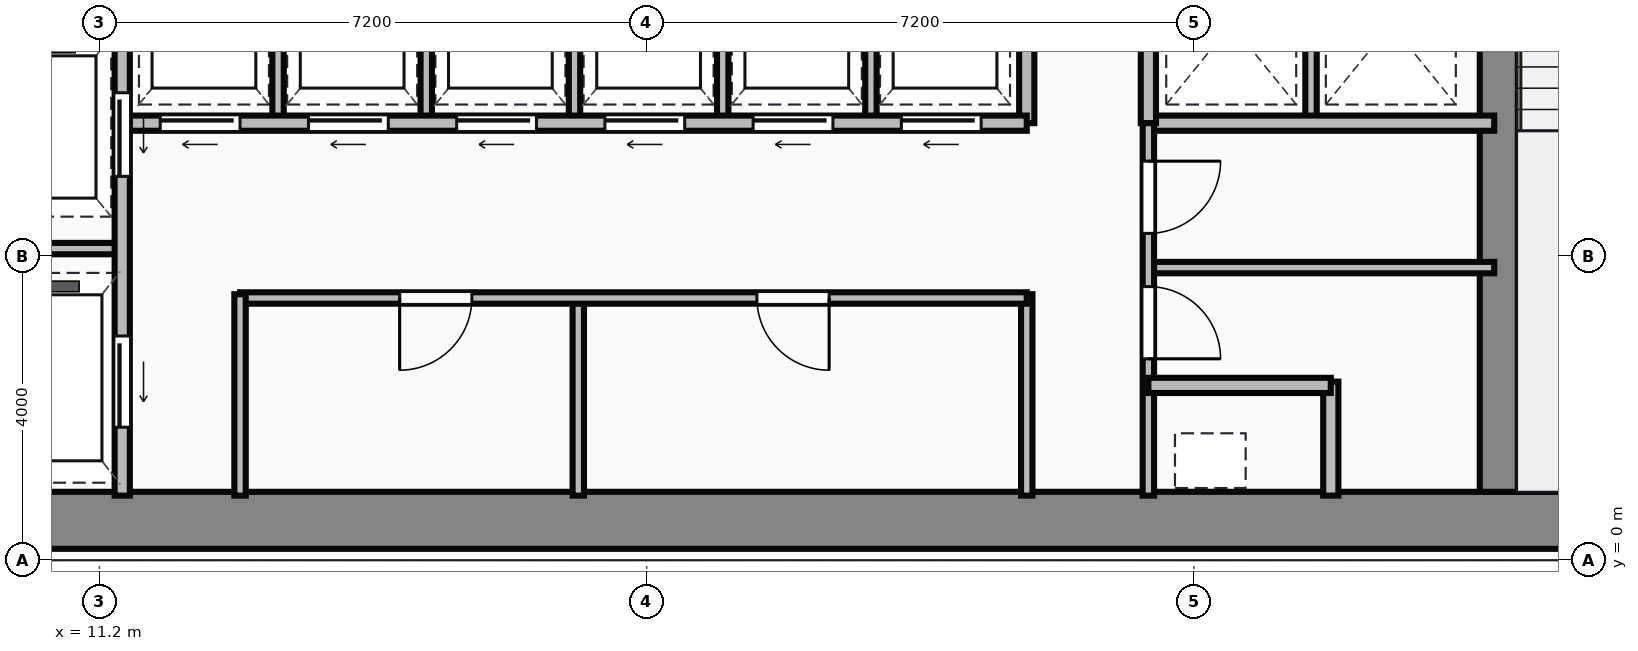
"""IFC4 building model, lengths in metres.
Left out: names, types, materials, properties, quantities, classifications, styles, units other than length and angle.
Written with IfcOpenShell. Run it as: python <this file> out.ifc"""

import sys

from ifc_helpers import new_model, si_unit, direction, frame, frame_2d, origin, place, context, subcontext, project, spatial, rectangle, extrude, source, transform, mapped, element, fill, save


model = new_model("IFC4")
c1 = context("Model", 3, precision=1e-05, world=origin(), true_north=direction((0.0, 1.0)))
c2 = subcontext(c1, "Body", "Model", "MODEL_VIEW")
j1 = project(units=[si_unit("LENGTHUNIT", "METRE"), si_unit("PLANEANGLEUNIT", "RADIAN")], contexts=[c1])
p1 = place(None, origin())
s1 = spatial("IfcSite", under=j1, at=p1, CompositionType="ELEMENT")
p2 = place(p1, origin())
s2 = spatial("IfcBuilding", under=s1, at=p2, CompositionType="ELEMENT")
p3 = place(p2, frame((0.0, 0.0, 158.85)))
s3 = spatial("IfcBuildingStorey", under=s2, at=p3, CompositionType="ELEMENT", Elevation=158.85)
m1 = source(origin(), c2, "Body", "SweptSolid", [
    extrude(rectangle(XDim=29.5, YDim=0.75, at=frame_2d((14.75, 0.0))), origin(), (0.0, 0.0, 1.0), 3.65),
])
p4 = place(p3, frame((4.5, 0.525, 0.0), z_axis=(0.0, 0.0, 1.0), x_axis=(1.0, 0.0, 0.0)))
e1 = element("IfcWall", 1, at=p4, inside=s3, PredefinedType="SHEAR", context=c2, shape_type="MappedRepresentation", body=[
    mapped(m1, transform((0.0, 0.0, 0.0))),
])
m2 = source(origin(), c2, "Body", "SweptSolid", [
    extrude(rectangle(XDim=12.35, YDim=0.5, at=frame_2d((6.175, 0.0))), origin(), (0.0, 0.0, 1.0), 3.65),
])
p5 = place(p3, frame((29.61, 0.9, 0.0), z_axis=(0.0, 0.0, 1.0), x_axis=(0.0, 1.0, 0.0)))
e2 = element("IfcWall", 2, at=p5, inside=s3, PredefinedType="SHEAR", context=c2, shape_type="MappedRepresentation", body=[
    mapped(m2, transform((0.0, 0.0, 0.0))),
])
m3 = source(origin(), c2, "Body", "SweptSolid", [
    extrude(rectangle(XDim=9.6, YDim=0.2, at=frame_2d((4.8, 0.0))), origin(), (0.0, 0.0, 1.0), 3.4),
])
p6 = place(p3, frame((11.5, 0.85, 0.0), z_axis=(0.0, 0.0, 1.0), x_axis=(0.0, 1.0, 0.0)))
e3 = element("IfcWall", 3, at=p6, inside=s3, PredefinedType="PARTITIONING", context=c2, shape_type="MappedRepresentation", body=[
    mapped(m3, transform((0.0, 0.0, 0.0))),
])
p7 = place(p6, frame((4.2, 0.0, 0.0)))
e4 = element("IfcOpeningElement", 4, at=p7, cuts=e3, PredefinedType="OPENING", context=c2, shape_type="SweptSolid", body=[
    extrude(rectangle(XDim=1.1, YDim=2.15, at=frame_2d((0.55, 1.075))), frame((0.0, 0.11, 0.0), z_axis=(0.0, -1.0, 0.0), x_axis=(1.0, 0.0, 0.0)), (0.0, 0.0, 1.0), 0.22),
])
p8 = place(p6, frame((0.9, 0.0, 0.0)))
e5 = element("IfcOpeningElement", 5, at=p8, cuts=e3, PredefinedType="OPENING", context=c2, shape_type="SweptSolid", body=[
    extrude(rectangle(XDim=1.2, YDim=2.15, at=frame_2d((0.6, 1.075))), frame((0.0, 0.11, 0.0), z_axis=(0.0, -1.0, 0.0), x_axis=(1.0, 0.0, 0.0)), (0.0, 0.0, 1.0), 0.22),
])
m4 = source(origin(), c2, "Body", "SweptSolid", [
    extrude(rectangle(XDim=2.4, YDim=0.15, at=frame_2d((1.2, 0.0))), origin(), (0.0, 0.0, 1.0), 3.4),
])
p9 = place(p3, frame((9.1, 4.1, 0.0), z_axis=(0.0, 0.0, 1.0), x_axis=(1.0, 0.0, 0.0)))
e6 = element("IfcWall", 6, at=p9, inside=s3, PredefinedType="PARTITIONING", context=c2, shape_type="MappedRepresentation", body=[
    mapped(m4, transform((0.0, 0.0, 0.0))),
])
m5 = source(origin(), c2, "Body", "SweptSolid", [
    extrude(rectangle(XDim=2.65, YDim=0.15, at=frame_2d((1.325, 0.0))), origin(), (0.0, 0.0, 1.0), 3.4),
])
p10 = place(p3, frame((13.05, 0.85, 0.0), z_axis=(0.0, 0.0, 1.0), x_axis=(0.0, 1.0, 0.0)))
e7 = element("IfcWall", 7, at=p10, inside=s3, PredefinedType="PARTITIONING", context=c2, shape_type="MappedRepresentation", body=[
    mapped(m5, transform((0.0, 0.0, 0.0))),
])
m6 = source(origin(), c2, "Body", "SweptSolid", [
    extrude(rectangle(XDim=10.35, YDim=0.15, at=frame_2d((5.175, 0.0))), origin(), (0.0, 0.0, 1.0), 3.4),
])
p11 = place(p3, frame((13.05, 3.45, 0.0), z_axis=(0.0, 0.0, 1.0), x_axis=(1.0, 0.0, 0.0)))
e8 = element("IfcWall", 8, at=p11, inside=s3, PredefinedType="PARTITIONING", context=c2, shape_type="MappedRepresentation", body=[
    mapped(m6, transform((0.0, 0.0, 0.0))),
])
p12 = place(p11, frame((2.1, 0.0, 0.0)))
e9 = element("IfcOpeningElement", 9, at=p12, cuts=e8, PredefinedType="OPENING", context=c2, shape_type="SweptSolid", body=[
    extrude(rectangle(XDim=0.95, YDim=2.15, at=frame_2d((0.475, 1.075))), frame((0.0, 0.085, 0.0), z_axis=(0.0, -1.0, 0.0), x_axis=(1.0, 0.0, 0.0)), (0.0, 0.0, 1.0), 0.17),
])
p13 = place(p11, frame((6.8, 0.0, 0.0)))
e10 = element("IfcOpeningElement", 10, at=p13, cuts=e8, PredefinedType="OPENING", context=c2, shape_type="SweptSolid", body=[
    extrude(rectangle(XDim=0.95, YDim=2.15, at=frame_2d((0.475, 1.075))), frame((0.0, 0.085, 0.0), z_axis=(0.0, -1.0, 0.0), x_axis=(1.0, 0.0, 0.0)), (0.0, 0.0, 1.0), 0.17),
])
p14 = place(p3, frame((23.4, 0.85, 0.0), z_axis=(0.0, 0.0, 1.0), x_axis=(0.0, 1.0, 0.0)))
e11 = element("IfcWall", 11, at=p14, inside=s3, PredefinedType="PARTITIONING", context=c2, shape_type="MappedRepresentation", body=[
    mapped(m5, transform((0.0, 0.0, 0.0))),
])
m7 = source(origin(), c2, "Body", "SweptSolid", [
    extrude(rectangle(XDim=2.6, YDim=0.15, at=frame_2d((1.3, 0.0))), origin(), (0.0, 0.0, 1.0), 3.4),
])
p15 = place(p3, frame((17.5, 0.85, 0.0), z_axis=(0.0, 0.0, 1.0), x_axis=(0.0, 1.0, 0.0)))
e12 = element("IfcWall", 12, at=p15, inside=s3, PredefinedType="PARTITIONING", context=c2, shape_type="MappedRepresentation", body=[
    mapped(m7, transform((0.0, 0.0, 0.0))),
])
m8 = source(origin(), c2, "Body", "SweptSolid", [
    extrude(rectangle(XDim=11.85, YDim=0.2, at=frame_2d((5.925, 0.0))), origin(), (0.0, 0.0, 1.0), 3.4),
])
p16 = place(p3, frame((11.55, 5.75, 0.0), z_axis=(0.0, 0.0, 1.0), x_axis=(1.0, 0.0, 0.0)))
e13 = element("IfcWall", 13, at=p16, inside=s3, PredefinedType="PARTITIONING", context=c2, shape_type="MappedRepresentation", body=[
    mapped(m8, transform((0.0, 0.0, 0.0))),
])
p17 = place(p16, frame((0.45, 0.0, 0.0)))
e14 = element("IfcOpeningElement", 14, at=p17, cuts=e13, PredefinedType="OPENING", context=c2, shape_type="SweptSolid", body=[
    extrude(rectangle(XDim=1.05, YDim=2.15, at=frame_2d((0.525, 1.075))), frame((0.0, 0.11, 0.0), z_axis=(0.0, -1.0, 0.0), x_axis=(1.0, 0.0, 0.0)), (0.0, 0.0, 1.0), 0.22),
])
p18 = place(p16, frame((2.4, 0.0, 0.0)))
e15 = element("IfcOpeningElement", 15, at=p18, cuts=e13, PredefinedType="OPENING", context=c2, shape_type="SweptSolid", body=[
    extrude(rectangle(XDim=1.05, YDim=2.15, at=frame_2d((0.525, 1.075))), frame((0.0, 0.11, 0.0), z_axis=(0.0, -1.0, 0.0), x_axis=(1.0, 0.0, 0.0)), (0.0, 0.0, 1.0), 0.22),
])
p19 = place(p16, frame((4.35, 0.0, 0.0)))
e16 = element("IfcOpeningElement", 16, at=p19, cuts=e13, PredefinedType="OPENING", context=c2, shape_type="SweptSolid", body=[
    extrude(rectangle(XDim=1.05, YDim=2.15, at=frame_2d((0.525, 1.075))), frame((0.0, 0.11, 0.0), z_axis=(0.0, -1.0, 0.0), x_axis=(1.0, 0.0, 0.0)), (0.0, 0.0, 1.0), 0.22),
])
p20 = place(p16, frame((6.3, 0.0, 0.0)))
e17 = element("IfcOpeningElement", 17, at=p20, cuts=e13, PredefinedType="OPENING", context=c2, shape_type="SweptSolid", body=[
    extrude(rectangle(XDim=1.05, YDim=2.15, at=frame_2d((0.525, 1.075))), frame((0.0, 0.11, 0.0), z_axis=(0.0, -1.0, 0.0), x_axis=(1.0, 0.0, 0.0)), (0.0, 0.0, 1.0), 0.22),
])
p21 = place(p16, frame((8.25, 0.0, 0.0)))
e18 = element("IfcOpeningElement", 18, at=p21, cuts=e13, PredefinedType="OPENING", context=c2, shape_type="SweptSolid", body=[
    extrude(rectangle(XDim=1.05, YDim=2.15, at=frame_2d((0.525, 1.075))), frame((0.0, 0.11, 0.0), z_axis=(0.0, -1.0, 0.0), x_axis=(1.0, 0.0, 0.0)), (0.0, 0.0, 1.0), 0.22),
])
p22 = place(p16, frame((10.2, 0.0, 0.0)))
e19 = element("IfcOpeningElement", 19, at=p22, cuts=e13, PredefinedType="OPENING", context=c2, shape_type="SweptSolid", body=[
    extrude(rectangle(XDim=1.05, YDim=2.15, at=frame_2d((0.525, 1.075))), frame((0.0, 0.11, 0.0), z_axis=(0.0, -1.0, 0.0), x_axis=(1.0, 0.0, 0.0)), (0.0, 0.0, 1.0), 0.22),
])
m9 = source(origin(), c2, "Body", "SweptSolid", [
    extrude(rectangle(XDim=2.6, YDim=0.2, at=frame_2d((1.3, 0.0))), origin(), (0.0, 0.0, 1.0), 3.4),
])
p23 = place(p3, frame((23.4, 5.75, 0.0), z_axis=(0.0, 0.0, 1.0), x_axis=(0.0, 1.0, 0.0)))
e20 = element("IfcWall", 20, at=p23, inside=s3, PredefinedType="PARTITIONING", context=c2, shape_type="MappedRepresentation", body=[
    mapped(m9, transform((0.0, 0.0, 0.0))),
])
m10 = source(origin(), c2, "Body", "SweptSolid", [
    extrude(rectangle(XDim=2.5, YDim=0.15, at=frame_2d((1.25, 0.0))), origin(), (0.0, 0.0, 1.0), 3.4),
])
for number, where, z_axis, x_axis in (
    (21, (13.55, 5.8, 0.0), (0.0, 0.0, 1.0), (0.0, 1.0, 0.0)),
    (22, (15.5, 5.8, 0.0), (0.0, 0.0, 1.0), (0.0, 1.0, 0.0)),
    (23, (17.45, 5.8, 0.0), (0.0, 0.0, 1.0), (0.0, 1.0, 0.0)),
    (24, (19.4, 5.8, 0.0), (0.0, 0.0, 1.0), (0.0, 1.0, 0.0)),
    (25, (21.35, 5.8, 0.0), (0.0, 0.0, 1.0), (0.0, 1.0, 0.0)),
):
    element("IfcWall", number, at=place(p3, frame(where, z_axis=z_axis, x_axis=x_axis)), inside=s3, PredefinedType="PARTITIONING", context=c2, shape_type="MappedRepresentation", body=[
        mapped(m10, transform((0.0, 0.0, 0.0))),
    ])
m11 = source(origin(), c2, "Body", "SweptSolid", [
    extrude(rectangle(XDim=4.55, YDim=0.2, at=frame_2d((2.275, 0.0))), origin(), (0.0, 0.0, 1.0), 3.4),
])
p24 = place(p3, frame((25.0, 5.75, 0.0), z_axis=(0.0, 0.0, 1.0), x_axis=(1.0, 0.0, 0.0)))
e26 = element("IfcWall", 26, at=p24, inside=s3, PredefinedType="PARTITIONING", context=c2, shape_type="MappedRepresentation", body=[
    mapped(m11, transform((0.0, 0.0, 0.0))),
])
p25 = place(p3, frame((25.0, 5.75, 0.0), z_axis=(0.0, 0.0, 1.0), x_axis=(0.0, 1.0, 0.0)))
e27 = element("IfcWall", 27, at=p25, inside=s3, PredefinedType="PARTITIONING", context=c2, shape_type="MappedRepresentation", body=[
    mapped(m9, transform((0.0, 0.0, 0.0))),
])
p26 = place(p3, frame((27.14, 5.8, 0.0), z_axis=(0.0, 0.0, 1.0), x_axis=(0.0, 1.0, 0.0)))
e28 = element("IfcWall", 28, at=p26, inside=s3, PredefinedType="PARTITIONING", context=c2, shape_type="MappedRepresentation", body=[
    mapped(m10, transform((0.0, 0.0, 0.0))),
])
m12 = source(origin(), c2, "Body", "SweptSolid", [
    extrude(rectangle(XDim=4.9, YDim=0.15, at=frame_2d((2.45, 0.0))), origin(), (0.0, 0.0, 1.0), 3.4),
])
p27 = place(p3, frame((25.0, 0.85, 0.0), z_axis=(0.0, 0.0, 1.0), x_axis=(0.0, 1.0, 0.0)))
e29 = element("IfcWall", 29, at=p27, inside=s3, PredefinedType="PARTITIONING", context=c2, shape_type="MappedRepresentation", body=[
    mapped(m12, transform((0.0, 0.0, 0.0))),
])
p28 = place(p27, frame((1.8, 0.0, 0.0)))
e30 = element("IfcOpeningElement", 30, at=p28, cuts=e29, PredefinedType="OPENING", context=c2, shape_type="SweptSolid", body=[
    extrude(rectangle(XDim=0.95, YDim=2.15, at=frame_2d((0.475, 1.075))), frame((0.0, 0.085, 0.0), z_axis=(0.0, -1.0, 0.0), x_axis=(1.0, 0.0, 0.0)), (0.0, 0.0, 1.0), 0.17),
])
p29 = place(p27, frame((3.45, 0.0, 0.0)))
e31 = element("IfcOpeningElement", 31, at=p29, cuts=e29, PredefinedType="OPENING", context=c2, shape_type="SweptSolid", body=[
    extrude(rectangle(XDim=0.95, YDim=2.15, at=frame_2d((0.475, 1.075))), frame((0.0, 0.085, 0.0), z_axis=(0.0, -1.0, 0.0), x_axis=(1.0, 0.0, 0.0)), (0.0, 0.0, 1.0), 0.17),
])
m13 = source(origin(), c2, "Body", "SweptSolid", [
    extrude(rectangle(XDim=2.4, YDim=0.2, at=frame_2d((1.2, 0.0))), origin(), (0.0, 0.0, 1.0), 3.4),
])
p30 = place(p3, frame((25.0, 2.3, 0.0), z_axis=(0.0, 0.0, 1.0), x_axis=(1.0, 0.0, 0.0)))
e32 = element("IfcWall", 32, at=p30, inside=s3, PredefinedType="PARTITIONING", context=c2, shape_type="MappedRepresentation", body=[
    mapped(m13, transform((0.0, 0.0, 0.0))),
])
m14 = source(origin(), c2, "Body", "SweptSolid", [
    extrude(rectangle(XDim=1.5, YDim=0.2, at=frame_2d((0.75, 0.0))), origin(), (0.0, 0.0, 1.0), 3.4),
])
p31 = place(p3, frame((27.4, 0.85, 0.0), z_axis=(0.0, 0.0, 1.0), x_axis=(0.0, 1.0, 0.0)))
e33 = element("IfcWall", 33, at=p31, inside=s3, PredefinedType="PARTITIONING", context=c2, shape_type="MappedRepresentation", body=[
    mapped(m14, transform((0.0, 0.0, 0.0))),
])
m15 = source(origin(), c2, "Body", "SweptSolid", [
    extrude(rectangle(XDim=4.55, YDim=0.15, at=frame_2d((2.275, 0.0))), origin(), (0.0, 0.0, 1.0), 3.4),
])
p32 = place(p3, frame((25.0, 3.85, 0.0), z_axis=(0.0, 0.0, 1.0), x_axis=(1.0, 0.0, 0.0)))
e34 = element("IfcWall", 34, at=p32, inside=s3, PredefinedType="PARTITIONING", context=c2, shape_type="MappedRepresentation", body=[
    mapped(m15, transform((0.0, 0.0, 0.0))),
])
m16 = source(origin(), c2, "Body", "SweptSolid", [
    extrude(rectangle(XDim=1.1, YDim=2.15, at=frame_2d((0.55, 1.075))), frame((0.0, 0.025, 0.0), z_axis=(0.0, -1.0, 0.0), x_axis=(1.0, 0.0, 0.0)), (0.0, 0.0, 1.0), 0.05),
])
p33 = place(p7, frame((1.1, 0.0, 0.0), z_axis=(0.0, 0.0, 1.0), x_axis=(-1.0, 0.0, 0.0)))
e35 = element("IfcDoor", 35, at=p33, inside=s3, OperationType="SLIDING_TO_LEFT", PredefinedType="DOOR", context=c2, shape_type="MappedRepresentation", body=[
    mapped(m16, transform((0.0, 0.0, 0.0))),
])
fill(e4, e35)
m17 = source(origin(), c2, "Body", "SweptSolid", [
    extrude(rectangle(XDim=1.2, YDim=2.15, at=frame_2d((0.6, 1.075))), frame((0.0, 0.025, 0.0), z_axis=(0.0, -1.0, 0.0), x_axis=(1.0, 0.0, 0.0)), (0.0, 0.0, 1.0), 0.05),
])
p34 = place(p8, frame((1.2, 0.0, 0.0), z_axis=(0.0, 0.0, 1.0), x_axis=(-1.0, 0.0, 0.0)))
e36 = element("IfcDoor", 36, at=p34, inside=s3, OperationType="SLIDING_TO_LEFT", PredefinedType="DOOR", context=c2, shape_type="MappedRepresentation", body=[
    mapped(m17, transform((0.0, 0.0, 0.0))),
])
fill(e5, e36)
m18 = source(origin(), c2, "Body", "SweptSolid", [
    extrude(rectangle(XDim=0.95, YDim=2.15, at=frame_2d((0.475, 1.075))), frame((0.0, 0.025, 0.0), z_axis=(0.0, -1.0, 0.0), x_axis=(1.0, 0.0, 0.0)), (0.0, 0.0, 1.0), 0.05),
])
p35 = place(p12, origin())
e37 = element("IfcDoor", 37, at=p35, inside=s3, OperationType="SINGLE_SWING_LEFT", PredefinedType="DOOR", context=c2, shape_type="MappedRepresentation", body=[
    mapped(m18, transform((0.0, 0.0, 0.0))),
])
fill(e9, e37)
p36 = place(p13, origin())
e38 = element("IfcDoor", 38, at=p36, inside=s3, OperationType="SINGLE_SWING_RIGHT", PredefinedType="DOOR", context=c2, shape_type="MappedRepresentation", body=[
    mapped(m18, transform((0.0, 0.0, 0.0))),
])
fill(e10, e38)
m19 = source(origin(), c2, "Body", "SweptSolid", [
    extrude(rectangle(XDim=1.05, YDim=2.15, at=frame_2d((0.525, 1.075))), frame((0.0, 0.025, 0.0), z_axis=(0.0, -1.0, 0.0), x_axis=(1.0, 0.0, 0.0)), (0.0, 0.0, 1.0), 0.05),
])
p37 = place(p17, frame((1.05, 0.0, 0.0), z_axis=(0.0, 0.0, 1.0), x_axis=(-1.0, 0.0, 0.0)))
e39 = element("IfcDoor", 39, at=p37, inside=s3, OperationType="SLIDING_TO_LEFT", PredefinedType="DOOR", context=c2, shape_type="MappedRepresentation", body=[
    mapped(m19, transform((0.0, 0.0, 0.0))),
])
fill(e14, e39)
p38 = place(p18, frame((1.05, 0.0, 0.0), z_axis=(0.0, 0.0, 1.0), x_axis=(-1.0, 0.0, 0.0)))
e40 = element("IfcDoor", 40, at=p38, inside=s3, OperationType="SLIDING_TO_LEFT", PredefinedType="DOOR", context=c2, shape_type="MappedRepresentation", body=[
    mapped(m19, transform((0.0, 0.0, 0.0))),
])
fill(e15, e40)
p39 = place(p19, frame((1.05, 0.0, 0.0), z_axis=(0.0, 0.0, 1.0), x_axis=(-1.0, 0.0, 0.0)))
e41 = element("IfcDoor", 41, at=p39, inside=s3, OperationType="SLIDING_TO_LEFT", PredefinedType="DOOR", context=c2, shape_type="MappedRepresentation", body=[
    mapped(m19, transform((0.0, 0.0, 0.0))),
])
fill(e16, e41)
p40 = place(p20, frame((1.05, 0.0, 0.0), z_axis=(0.0, 0.0, 1.0), x_axis=(-1.0, 0.0, 0.0)))
e42 = element("IfcDoor", 42, at=p40, inside=s3, OperationType="SLIDING_TO_LEFT", PredefinedType="DOOR", context=c2, shape_type="MappedRepresentation", body=[
    mapped(m19, transform((0.0, 0.0, 0.0))),
])
fill(e17, e42)
p41 = place(p21, frame((1.05, 0.0, 0.0), z_axis=(0.0, 0.0, 1.0), x_axis=(-1.0, 0.0, 0.0)))
e43 = element("IfcDoor", 43, at=p41, inside=s3, OperationType="SLIDING_TO_LEFT", PredefinedType="DOOR", context=c2, shape_type="MappedRepresentation", body=[
    mapped(m19, transform((0.0, 0.0, 0.0))),
])
fill(e18, e43)
p42 = place(p22, frame((1.05, 0.0, 0.0), z_axis=(0.0, 0.0, 1.0), x_axis=(-1.0, 0.0, 0.0)))
e44 = element("IfcDoor", 44, at=p42, inside=s3, OperationType="SLIDING_TO_LEFT", PredefinedType="DOOR", context=c2, shape_type="MappedRepresentation", body=[
    mapped(m19, transform((0.0, 0.0, 0.0))),
])
fill(e19, e44)
p43 = place(p28, origin())
e45 = element("IfcDoor", 45, at=p43, inside=s3, OperationType="SINGLE_SWING_LEFT", PredefinedType="DOOR", context=c2, shape_type="MappedRepresentation", body=[
    mapped(m18, transform((0.0, 0.0, 0.0))),
])
fill(e30, e45)
p44 = place(p29, origin())
e46 = element("IfcDoor", 46, at=p44, inside=s3, OperationType="SINGLE_SWING_RIGHT", PredefinedType="DOOR", context=c2, shape_type="MappedRepresentation", body=[
    mapped(m18, transform((0.0, 0.0, 0.0))),
])
fill(e31, e46)
save(model, sys.argv[1])
